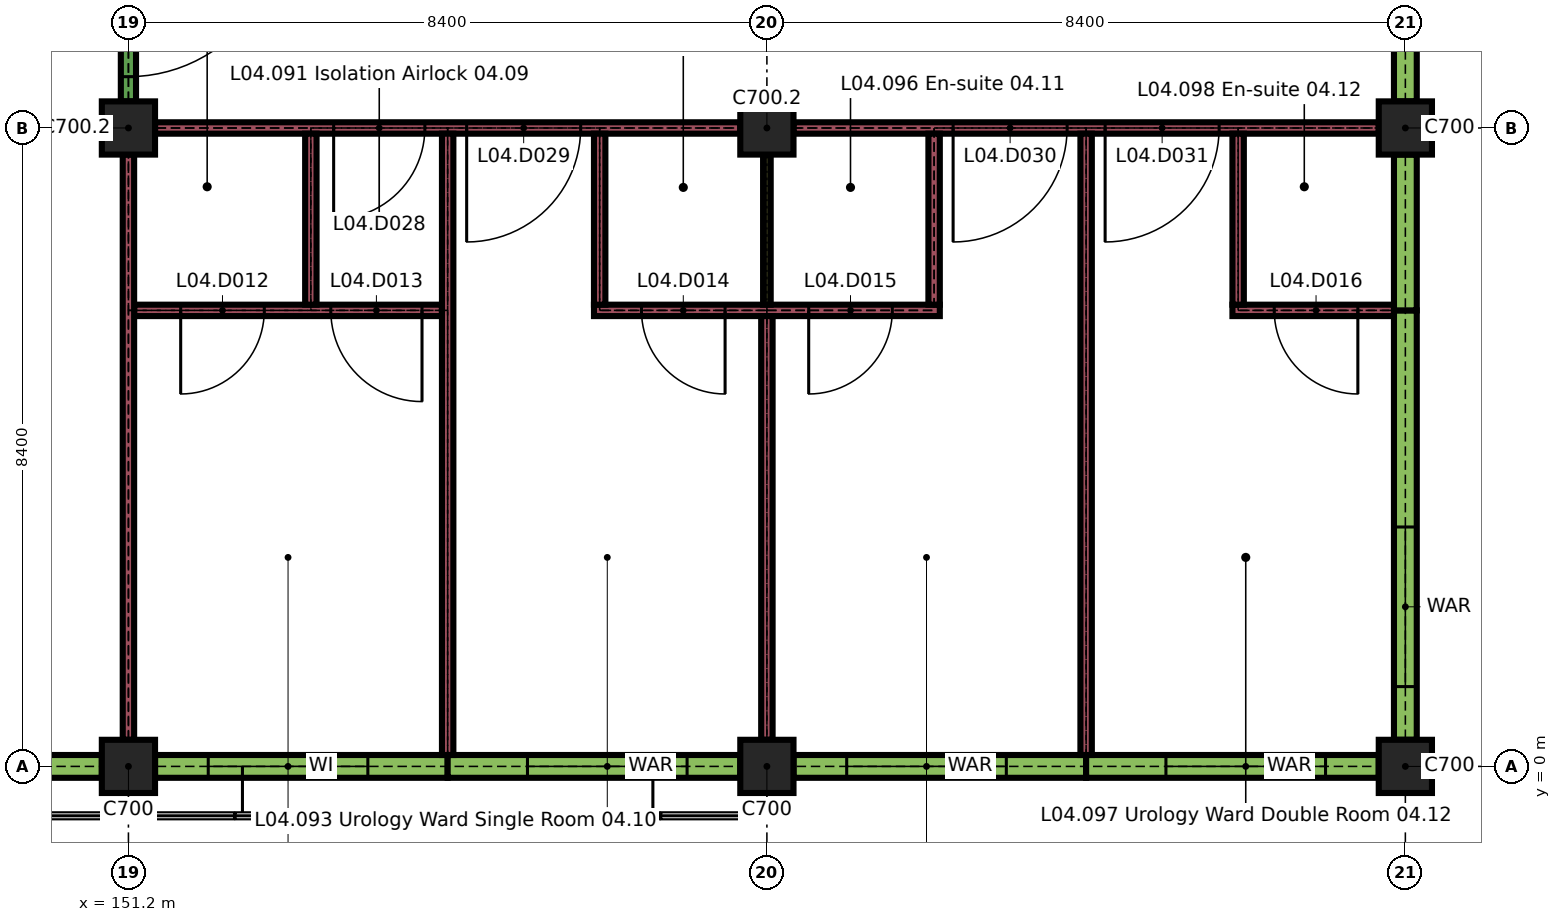
"""IFC4 building model, lengths in metres.
Left out: names, types, materials, properties, quantities, classifications, styles, units other than length and angle.
Written with IfcOpenShell. Run it as: python <this file> out.ifc"""

import sys

from ifc_helpers import new_model, si_unit, direction, frame, frame_2d, origin, origin_2d, place, context, subcontext, project, spatial, rectangle, extrude, element, fill, save


model = new_model("IFC4")
c1 = context("Model", 3, precision=1e-05, world=origin(), true_north=direction((0.0, 1.0)))
c2 = subcontext(c1, "Body", "Model", "MODEL_VIEW")
j1 = project(units=[si_unit("LENGTHUNIT", "METRE"), si_unit("PLANEANGLEUNIT", "RADIAN")], contexts=[c1])
p1 = place(None, origin())
s1 = spatial("IfcSite", under=j1, at=p1, CompositionType="ELEMENT")
p2 = place(p1, origin())
s2 = spatial("IfcBuilding", under=s1, at=p2, CompositionType="ELEMENT")
p3 = place(p2, frame((0.0, 0.0, 18.9)))
s3 = spatial("IfcBuildingStorey", under=s2, at=p3, CompositionType="ELEMENT", Elevation=18.9)
for number, where, z_axis, x_axis in (
    (1, (151.2, 0.0, 0.0), (0.0, 0.0, 1.0), (1.0, 0.0, 0.0)),
    (2, (159.6, 0.0, 0.0), (0.0, 0.0, 1.0), (1.0, 0.0, 0.0)),
    (3, (168.0, 0.0, 0.0), (0.0, 0.0, 1.0), (1.0, 0.0, 0.0)),
    (4, (151.2, 8.4, 0.0), (0.0, 0.0, 1.0), (1.0, 0.0, 0.0)),
    (5, (159.6, 8.4, 0.0), (0.0, 0.0, 1.0), (1.0, 0.0, 0.0)),
    (6, (168.0, 8.4, 0.0), (0.0, 0.0, 1.0), (1.0, 0.0, 0.0)),
):
    element("IfcColumn", number, at=place(p3, frame(where, z_axis=z_axis, x_axis=x_axis)), inside=s3, PredefinedType="COLUMN", context=c2, shape_type="SweptSolid", body=[
        extrude(rectangle(XDim=0.7, YDim=0.7, at=origin_2d()), origin(), (0.0, 0.0, 1.0), 3.26),
    ])
p4 = place(p3, frame((149.7, 0.0, 0.0), z_axis=(0.0, 0.0, 1.0), x_axis=(1.0, 0.0, 0.0)))
e7 = element("IfcWall", 7, at=p4, inside=s3, PredefinedType="SOLIDWALL", context=c2, shape_type="SweptSolid", body=[
    extrude(rectangle(XDim=1.15, YDim=0.3, at=frame_2d((0.575, 0.0))), origin(), (0.0, 0.0, 1.0), 2.96),
])
p5 = place(p3, frame((151.55, 0.0, 0.0), z_axis=(0.0, 0.0, 1.0), x_axis=(1.0, 0.0, 0.0)))
e8 = element("IfcWall", 8, at=p5, inside=s3, PredefinedType="SOLIDWALL", context=c2, shape_type="SweptSolid", body=[
    extrude(rectangle(XDim=3.85, YDim=0.3, at=frame_2d((1.925, 0.0))), origin(), (0.0, 0.0, 1.0), 2.96),
])
p6 = place(p5, frame((0.7, 0.0, 0.9)))
e9 = element("IfcOpeningElement", 9, at=p6, cuts=e8, PredefinedType="OPENING", context=c2, shape_type="SweptSolid", body=[
    extrude(rectangle(XDim=2.1, YDim=1.5, at=frame_2d((1.05, 0.75))), frame((0.0, 0.16, 0.0), z_axis=(0.0, -1.0, 0.0), x_axis=(1.0, 0.0, 0.0)), (0.0, 0.0, 1.0), 0.32),
])
p7 = place(p3, frame((155.4, 0.0, 0.0), z_axis=(0.0, 0.0, 1.0), x_axis=(1.0, 0.0, 0.0)))
e10 = element("IfcWall", 10, at=p7, inside=s3, PredefinedType="SOLIDWALL", context=c2, shape_type="SweptSolid", body=[
    extrude(rectangle(XDim=3.85, YDim=0.3, at=frame_2d((1.925, 0.0))), origin(), (0.0, 0.0, 1.0), 2.96),
])
p8 = place(p7, frame((1.05, 0.0, 0.9)))
e11 = element("IfcOpeningElement", 11, at=p8, cuts=e10, PredefinedType="OPENING", context=c2, shape_type="SweptSolid", body=[
    extrude(rectangle(XDim=2.1, YDim=1.5, at=frame_2d((1.05, 0.75))), frame((0.0, 0.16, 0.0), z_axis=(0.0, -1.0, 0.0), x_axis=(1.0, 0.0, 0.0)), (0.0, 0.0, 1.0), 0.32),
])
p9 = place(p3, frame((159.95, 0.0, 0.0), z_axis=(0.0, 0.0, 1.0), x_axis=(1.0, 0.0, 0.0)))
e12 = element("IfcWall", 12, at=p9, inside=s3, PredefinedType="SOLIDWALL", context=c2, shape_type="SweptSolid", body=[
    extrude(rectangle(XDim=3.85, YDim=0.3, at=frame_2d((1.925, 0.0))), origin(), (0.0, 0.0, 1.0), 2.96),
])
p10 = place(p9, frame((0.7, 0.0, 0.9)))
e13 = element("IfcOpeningElement", 13, at=p10, cuts=e12, PredefinedType="OPENING", context=c2, shape_type="SweptSolid", body=[
    extrude(rectangle(XDim=2.1, YDim=1.5, at=frame_2d((1.05, 0.75))), frame((0.0, 0.16, 0.0), z_axis=(0.0, -1.0, 0.0), x_axis=(1.0, 0.0, 0.0)), (0.0, 0.0, 1.0), 0.32),
])
p11 = place(p3, frame((163.8, 0.0, 0.0), z_axis=(0.0, 0.0, 1.0), x_axis=(1.0, 0.0, 0.0)))
e14 = element("IfcWall", 14, at=p11, inside=s3, PredefinedType="SOLIDWALL", context=c2, shape_type="SweptSolid", body=[
    extrude(rectangle(XDim=3.85, YDim=0.3, at=frame_2d((1.925, 0.0))), origin(), (0.0, 0.0, 1.0), 2.96),
])
p12 = place(p11, frame((1.05, 0.0, 0.9)))
e15 = element("IfcOpeningElement", 15, at=p12, cuts=e14, PredefinedType="OPENING", context=c2, shape_type="SweptSolid", body=[
    extrude(rectangle(XDim=2.1, YDim=1.5, at=frame_2d((1.05, 0.75))), frame((0.0, 0.16, 0.0), z_axis=(0.0, -1.0, 0.0), x_axis=(1.0, 0.0, 0.0)), (0.0, 0.0, 1.0), 0.32),
])
p13 = place(p3, frame((168.0, 0.35, 0.0), z_axis=(0.0, 0.0, 1.0), x_axis=(0.0, 1.0, 0.0)))
e16 = element("IfcWall", 16, at=p13, inside=s3, PredefinedType="SOLIDWALL", context=c2, shape_type="SweptSolid", body=[
    extrude(rectangle(XDim=5.65, YDim=0.3, at=frame_2d((2.825, 0.0))), origin(), (0.0, 0.0, 1.0), 2.96),
])
p14 = place(p13, frame((0.7, 0.0, 0.9)))
e17 = element("IfcOpeningElement", 17, at=p14, cuts=e16, PredefinedType="OPENING", context=c2, shape_type="SweptSolid", body=[
    extrude(rectangle(XDim=2.1, YDim=1.5, at=frame_2d((1.05, 0.75))), frame((0.0, 0.16, 0.0), z_axis=(0.0, -1.0, 0.0), x_axis=(1.0, 0.0, 0.0)), (0.0, 0.0, 1.0), 0.32),
])
p15 = place(p3, frame((168.0, 6.0, 0.0), z_axis=(0.0, 0.0, 1.0), x_axis=(0.0, 1.0, 0.0)))
e18 = element("IfcWall", 18, at=p15, inside=s3, PredefinedType="SOLIDWALL", context=c2, shape_type="SweptSolid", body=[
    extrude(rectangle(XDim=2.05, YDim=0.3, at=frame_2d((1.025, 0.0))), origin(), (0.0, 0.0, 1.0), 2.96),
])
p16 = place(p3, frame((168.0, 8.75, 0.0), z_axis=(0.0, 0.0, 1.0), x_axis=(0.0, 1.0, 0.0)))
e19 = element("IfcWall", 19, at=p16, inside=s3, PredefinedType="SOLIDWALL", context=c2, shape_type="SweptSolid", body=[
    extrude(rectangle(XDim=2.65, YDim=0.3, at=frame_2d((1.325, 0.0))), origin(), (0.0, 0.0, 1.0), 2.96),
])
p17 = place(p16, frame((1.3, 0.0, 0.9)))
e20 = element("IfcOpeningElement", 20, at=p17, cuts=e19, PredefinedType="OPENING", context=c2, shape_type="SweptSolid", body=[
    extrude(rectangle(XDim=0.9, YDim=1.5, at=frame_2d((0.45, 0.75))), frame((0.0, 0.16, 0.0), z_axis=(0.0, -1.0, 0.0), x_axis=(1.0, 0.0, 0.0)), (0.0, 0.0, 1.0), 0.32),
])
p18 = place(p3, frame((151.275, 6.0, 0.0), z_axis=(0.0, 0.0, 1.0), x_axis=(1.0, 0.0, 0.0)))
e21 = element("IfcWall", 21, at=p18, inside=s3, PredefinedType="PARTITIONING", context=c2, shape_type="SweptSolid", body=[
    extrude(rectangle(XDim=4.05, YDim=0.15, at=frame_2d((2.025, 0.0))), origin(), (0.0, 0.0, 1.0), 3.26),
])
p19 = place(p18, frame((0.613, 0.0, 0.0)))
e22 = element("IfcOpeningElement", 22, at=p19, cuts=e21, PredefinedType="OPENING", context=c2, shape_type="SweptSolid", body=[
    extrude(rectangle(XDim=1.1, YDim=2.1, at=frame_2d((0.55, 1.05))), frame((0.0, 0.085, 0.0), z_axis=(0.0, -1.0, 0.0), x_axis=(1.0, 0.0, 0.0)), (0.0, 0.0, 1.0), 0.17),
])
p20 = place(p18, frame((2.587, 0.0, 0.0)))
e23 = element("IfcOpeningElement", 23, at=p20, cuts=e21, PredefinedType="OPENING", context=c2, shape_type="SweptSolid", body=[
    extrude(rectangle(XDim=1.2, YDim=2.1, at=frame_2d((0.6, 1.05))), frame((0.0, 0.085, 0.0), z_axis=(0.0, -1.0, 0.0), x_axis=(1.0, 0.0, 0.0)), (0.0, 0.0, 1.0), 0.17),
])
p21 = place(p3, frame((157.325, 6.0, 0.0), z_axis=(0.0, 0.0, 1.0), x_axis=(1.0, 0.0, 0.0)))
e24 = element("IfcWall", 24, at=p21, inside=s3, PredefinedType="PARTITIONING", context=c2, shape_type="SweptSolid", body=[
    extrude(rectangle(XDim=4.55, YDim=0.15, at=frame_2d((2.275, 0.0))), origin(), (0.0, 0.0, 1.0), 3.26),
])
p22 = place(p21, frame((0.625, 0.0, 0.0)))
e25 = element("IfcOpeningElement", 25, at=p22, cuts=e24, PredefinedType="OPENING", context=c2, shape_type="SweptSolid", body=[
    extrude(rectangle(XDim=1.1, YDim=2.1, at=frame_2d((0.55, 1.05))), frame((0.0, 0.085, 0.0), z_axis=(0.0, -1.0, 0.0), x_axis=(1.0, 0.0, 0.0)), (0.0, 0.0, 1.0), 0.17),
])
p23 = place(p21, frame((2.825, 0.0, 0.0)))
e26 = element("IfcOpeningElement", 26, at=p23, cuts=e24, PredefinedType="OPENING", context=c2, shape_type="SweptSolid", body=[
    extrude(rectangle(XDim=1.1, YDim=2.1, at=frame_2d((0.55, 1.05))), frame((0.0, 0.085, 0.0), z_axis=(0.0, -1.0, 0.0), x_axis=(1.0, 0.0, 0.0)), (0.0, 0.0, 1.0), 0.17),
])
p24 = place(p3, frame((165.725, 6.0, 0.0), z_axis=(0.0, 0.0, 1.0), x_axis=(1.0, 0.0, 0.0)))
e27 = element("IfcWall", 27, at=p24, inside=s3, PredefinedType="PARTITIONING", context=c2, shape_type="SweptSolid", body=[
    extrude(rectangle(XDim=2.125, YDim=0.15, at=frame_2d((1.062, 0.0))), origin(), (0.0, 0.0, 1.0), 3.26),
])
p25 = place(p24, frame((0.55, 0.0, 0.0)))
e28 = element("IfcOpeningElement", 28, at=p25, cuts=e27, PredefinedType="OPENING", context=c2, shape_type="SweptSolid", body=[
    extrude(rectangle(XDim=1.1, YDim=2.1, at=frame_2d((0.55, 1.05))), frame((0.0, 0.085, 0.0), z_axis=(0.0, -1.0, 0.0), x_axis=(1.0, 0.0, 0.0)), (0.0, 0.0, 1.0), 0.17),
])
p26 = place(p3, frame((151.55, 8.4, 0.0), z_axis=(0.0, 0.0, 1.0), x_axis=(1.0, 0.0, 0.0)))
e29 = element("IfcWall", 29, at=p26, inside=s3, PredefinedType="PARTITIONING", context=c2, shape_type="SweptSolid", body=[
    extrude(rectangle(XDim=7.7, YDim=0.15, at=frame_2d((3.85, 0.0))), origin(), (0.0, 0.0, 1.0), 3.26),
])
p27 = place(p26, frame((2.35, 0.0, 0.0)))
e30 = element("IfcOpeningElement", 30, at=p27, cuts=e29, PredefinedType="OPENING", context=c2, shape_type="SweptSolid", body=[
    extrude(rectangle(XDim=1.2, YDim=2.1, at=frame_2d((0.6, 1.05))), frame((0.0, 0.085, 0.0), z_axis=(0.0, -1.0, 0.0), x_axis=(1.0, 0.0, 0.0)), (0.0, 0.0, 1.0), 0.17),
])
p28 = place(p26, frame((4.1, 0.0, 0.0)))
e31 = element("IfcOpeningElement", 31, at=p28, cuts=e29, PredefinedType="OPENING", context=c2, shape_type="SweptSolid", body=[
    extrude(rectangle(XDim=1.5, YDim=2.4, at=frame_2d((0.75, 1.2))), frame((0.0, 0.085, 0.0), z_axis=(0.0, -1.0, 0.0), x_axis=(1.0, 0.0, 0.0)), (0.0, 0.0, 1.0), 0.17),
])
p29 = place(p3, frame((159.95, 8.4, 0.0), z_axis=(0.0, 0.0, 1.0), x_axis=(1.0, 0.0, 0.0)))
e32 = element("IfcWall", 32, at=p29, inside=s3, PredefinedType="PARTITIONING", context=c2, shape_type="SweptSolid", body=[
    extrude(rectangle(XDim=7.7, YDim=0.15, at=frame_2d((3.85, 0.0))), origin(), (0.0, 0.0, 1.0), 3.26),
])
p30 = place(p29, frame((2.1, 0.0, 0.0)))
e33 = element("IfcOpeningElement", 33, at=p30, cuts=e32, PredefinedType="OPENING", context=c2, shape_type="SweptSolid", body=[
    extrude(rectangle(XDim=1.5, YDim=2.4, at=frame_2d((0.75, 1.2))), frame((0.0, 0.085, 0.0), z_axis=(0.0, -1.0, 0.0), x_axis=(1.0, 0.0, 0.0)), (0.0, 0.0, 1.0), 0.17),
])
p31 = place(p29, frame((4.1, 0.0, 0.0)))
e34 = element("IfcOpeningElement", 34, at=p31, cuts=e32, PredefinedType="OPENING", context=c2, shape_type="SweptSolid", body=[
    extrude(rectangle(XDim=1.5, YDim=2.4, at=frame_2d((0.75, 1.2))), frame((0.0, 0.085, 0.0), z_axis=(0.0, -1.0, 0.0), x_axis=(1.0, 0.0, 0.0)), (0.0, 0.0, 1.0), 0.17),
])
p32 = place(p3, frame((151.2, 0.35, 0.0), z_axis=(0.0, 0.0, 1.0), x_axis=(0.0, 1.0, 0.0)))
e35 = element("IfcWall", 35, at=p32, inside=s3, PredefinedType="PARTITIONING", context=c2, shape_type="SweptSolid", body=[
    extrude(rectangle(XDim=7.7, YDim=0.15, at=frame_2d((3.85, 0.0))), origin(), (0.0, 0.0, 1.0), 3.26),
])
p33 = place(p3, frame((151.2, 8.75, 0.0), z_axis=(0.0, 0.0, 1.0), x_axis=(0.0, 1.0, 0.0)))
e36 = element("IfcWall", 36, at=p33, inside=s3, PredefinedType="PARTITIONING", context=c2, shape_type="SweptSolid", body=[
    extrude(rectangle(XDim=7.7, YDim=0.2, at=frame_2d((3.85, 0.0))), origin(), (0.0, 0.0, 1.0), 3.26),
])
p34 = place(p33, frame((0.325, 0.0, 0.0)))
e37 = element("IfcOpeningElement", 37, at=p34, cuts=e36, PredefinedType="OPENING", context=c2, shape_type="SweptSolid", body=[
    extrude(rectangle(XDim=2.0, YDim=2.4, at=frame_2d((1.0, 1.2))), frame((0.0, 0.11, 0.0), z_axis=(0.0, -1.0, 0.0), x_axis=(1.0, 0.0, 0.0)), (0.0, 0.0, 1.0), 0.22),
])
p35 = place(p33, frame((5.375, 0.0, 0.0)))
e38 = element("IfcOpeningElement", 38, at=p35, cuts=e36, PredefinedType="OPENING", context=c2, shape_type="SweptSolid", body=[
    extrude(rectangle(XDim=2.0, YDim=2.4, at=frame_2d((1.0, 1.2))), frame((0.0, 0.11, 0.0), z_axis=(0.0, -1.0, 0.0), x_axis=(1.0, 0.0, 0.0)), (0.0, 0.0, 1.0), 0.22),
])
p36 = place(p3, frame((153.6, 6.075, 0.0), z_axis=(0.0, 0.0, 1.0), x_axis=(0.0, 1.0, 0.0)))
e39 = element("IfcWall", 39, at=p36, inside=s3, PredefinedType="PARTITIONING", context=c2, shape_type="SweptSolid", body=[
    extrude(rectangle(XDim=2.25, YDim=0.15, at=frame_2d((1.125, 0.0))), origin(), (0.0, 0.0, 1.0), 3.26),
])
p37 = place(p3, frame((155.4, 0.15, 0.0), z_axis=(0.0, 0.0, 1.0), x_axis=(0.0, 1.0, 0.0)))
e40 = element("IfcWall", 40, at=p37, inside=s3, PredefinedType="PARTITIONING", context=c2, shape_type="SweptSolid", body=[
    extrude(rectangle(XDim=8.175, YDim=0.15, at=frame_2d((4.087, 0.0))), origin(), (0.0, 0.0, 1.0), 3.26),
])
p38 = place(p3, frame((157.4, 6.075, 0.0), z_axis=(0.0, 0.0, 1.0), x_axis=(0.0, 1.0, 0.0)))
e41 = element("IfcWall", 41, at=p38, inside=s3, PredefinedType="PARTITIONING", context=c2, shape_type="SweptSolid", body=[
    extrude(rectangle(XDim=2.25, YDim=0.15, at=frame_2d((1.125, 0.0))), origin(), (0.0, 0.0, 1.0), 3.26),
])
p39 = place(p3, frame((159.6, 0.35, 0.0), z_axis=(0.0, 0.0, 1.0), x_axis=(0.0, 1.0, 0.0)))
e42 = element("IfcWall", 42, at=p39, inside=s3, PredefinedType="PARTITIONING", context=c2, shape_type="SweptSolid", body=[
    extrude(rectangle(XDim=5.575, YDim=0.15, at=frame_2d((2.788, 0.0))), origin(), (0.0, 0.0, 1.0), 3.26),
])
p40 = place(p3, frame((159.6, 6.075, 0.0), z_axis=(0.0, 0.0, 1.0), x_axis=(0.0, 1.0, 0.0)))
e43 = element("IfcWall", 43, at=p40, inside=s3, PredefinedType="PARTITIONING", context=c2, shape_type="SweptSolid", body=[
    extrude(rectangle(XDim=1.975, YDim=0.1, at=frame_2d((0.988, 0.0))), origin(), (0.0, 0.0, 1.0), 3.26),
])
p41 = place(p3, frame((161.8, 6.075, 0.0), z_axis=(0.0, 0.0, 1.0), x_axis=(0.0, 1.0, 0.0)))
e44 = element("IfcWall", 44, at=p41, inside=s3, PredefinedType="PARTITIONING", context=c2, shape_type="SweptSolid", body=[
    extrude(rectangle(XDim=2.25, YDim=0.15, at=frame_2d((1.125, 0.0))), origin(), (0.0, 0.0, 1.0), 3.26),
])
p42 = place(p3, frame((163.8, 0.15, 0.0), z_axis=(0.0, 0.0, 1.0), x_axis=(0.0, 1.0, 0.0)))
e45 = element("IfcWall", 45, at=p42, inside=s3, PredefinedType="PARTITIONING", context=c2, shape_type="SweptSolid", body=[
    extrude(rectangle(XDim=8.175, YDim=0.15, at=frame_2d((4.087, 0.0))), origin(), (0.0, 0.0, 1.0), 3.26),
])
p43 = place(p3, frame((165.8, 6.075, 0.0), z_axis=(0.0, 0.0, 1.0), x_axis=(0.0, 1.0, 0.0)))
e46 = element("IfcWall", 46, at=p43, inside=s3, PredefinedType="PARTITIONING", context=c2, shape_type="SweptSolid", body=[
    extrude(rectangle(XDim=2.25, YDim=0.15, at=frame_2d((1.125, 0.0))), origin(), (0.0, 0.0, 1.0), 3.26),
])
p44 = place(p6, origin())
e47 = element("IfcWindow", 47, at=p44, inside=s3, PartitioningType="SINGLE_PANEL", PredefinedType="WINDOW", context=c2, shape_type="SweptSolid", body=[
    extrude(rectangle(XDim=2.1, YDim=1.5, at=frame_2d((1.05, 0.75))), frame((0.0, 0.045, 0.0), z_axis=(0.0, -1.0, 0.0), x_axis=(1.0, 0.0, 0.0)), (0.0, 0.0, 1.0), 0.09),
])
fill(e9, e47)
p45 = place(p8, origin())
e48 = element("IfcWindow", 48, at=p45, inside=s3, PartitioningType="DOUBLE_PANEL_VERTICAL", PredefinedType="WINDOW", context=c2, shape_type="SweptSolid", body=[
    extrude(rectangle(XDim=2.1, YDim=1.5, at=frame_2d((1.05, 0.75))), frame((0.0, 0.05, 0.0), z_axis=(0.0, -1.0, 0.0), x_axis=(1.0, 0.0, 0.0)), (0.0, 0.0, 1.0), 0.1),
])
fill(e11, e48)
p46 = place(p10, origin())
e49 = element("IfcWindow", 49, at=p46, inside=s3, PartitioningType="DOUBLE_PANEL_VERTICAL", PredefinedType="WINDOW", context=c2, shape_type="SweptSolid", body=[
    extrude(rectangle(XDim=2.1, YDim=1.5, at=frame_2d((1.05, 0.75))), frame((0.0, 0.05, 0.0), z_axis=(0.0, -1.0, 0.0), x_axis=(1.0, 0.0, 0.0)), (0.0, 0.0, 1.0), 0.1),
])
fill(e13, e49)
p47 = place(p12, origin())
e50 = element("IfcWindow", 50, at=p47, inside=s3, PartitioningType="DOUBLE_PANEL_VERTICAL", PredefinedType="WINDOW", context=c2, shape_type="SweptSolid", body=[
    extrude(rectangle(XDim=2.1, YDim=1.5, at=frame_2d((1.05, 0.75))), frame((0.0, 0.05, 0.0), z_axis=(0.0, -1.0, 0.0), x_axis=(1.0, 0.0, 0.0)), (0.0, 0.0, 1.0), 0.1),
])
fill(e15, e50)
p48 = place(p14, origin())
e51 = element("IfcWindow", 51, at=p48, inside=s3, PartitioningType="DOUBLE_PANEL_VERTICAL", PredefinedType="WINDOW", context=c2, shape_type="SweptSolid", body=[
    extrude(rectangle(XDim=2.1, YDim=1.5, at=frame_2d((1.05, 0.75))), frame((0.0, 0.05, 0.0), z_axis=(0.0, -1.0, 0.0), x_axis=(1.0, 0.0, 0.0)), (0.0, 0.0, 1.0), 0.1),
])
fill(e17, e51)
p49 = place(p19, origin())
e52 = element("IfcDoor", 52, at=p49, inside=s3, OperationType="SINGLE_SWING_LEFT", PredefinedType="DOOR", context=c2, shape_type="SweptSolid", body=[
    extrude(rectangle(XDim=1.1, YDim=2.1, at=frame_2d((0.55, 1.05))), frame((0.0, 0.025, 0.0), z_axis=(0.0, -1.0, 0.0), x_axis=(1.0, 0.0, 0.0)), (0.0, 0.0, 1.0), 0.05),
])
fill(e22, e52)
p50 = place(p20, origin())
e53 = element("IfcDoor", 53, at=p50, inside=s3, OperationType="SINGLE_SWING_RIGHT", PredefinedType="DOOR", context=c2, shape_type="SweptSolid", body=[
    extrude(rectangle(XDim=1.2, YDim=2.1, at=frame_2d((0.6, 1.05))), frame((0.0, 0.05, 0.0), z_axis=(0.0, -1.0, 0.0), x_axis=(1.0, 0.0, 0.0)), (0.0, 0.0, 1.0), 0.1),
])
fill(e23, e53)
p51 = place(p22, origin())
e54 = element("IfcDoor", 54, at=p51, inside=s3, OperationType="SINGLE_SWING_RIGHT", PredefinedType="DOOR", context=c2, shape_type="SweptSolid", body=[
    extrude(rectangle(XDim=1.1, YDim=2.1, at=frame_2d((0.55, 1.05))), frame((0.0, 0.025, 0.0), z_axis=(0.0, -1.0, 0.0), x_axis=(1.0, 0.0, 0.0)), (0.0, 0.0, 1.0), 0.05),
])
fill(e25, e54)
p52 = place(p23, origin())
e55 = element("IfcDoor", 55, at=p52, inside=s3, OperationType="SINGLE_SWING_LEFT", PredefinedType="DOOR", context=c2, shape_type="SweptSolid", body=[
    extrude(rectangle(XDim=1.1, YDim=2.1, at=frame_2d((0.55, 1.05))), frame((0.0, 0.025, 0.0), z_axis=(0.0, -1.0, 0.0), x_axis=(1.0, 0.0, 0.0)), (0.0, 0.0, 1.0), 0.05),
])
fill(e26, e55)
p53 = place(p25, origin())
e56 = element("IfcDoor", 56, at=p53, inside=s3, OperationType="SINGLE_SWING_RIGHT", PredefinedType="DOOR", context=c2, shape_type="SweptSolid", body=[
    extrude(rectangle(XDim=1.1, YDim=2.1, at=frame_2d((0.55, 1.05))), frame((0.0, 0.025, 0.0), z_axis=(0.0, -1.0, 0.0), x_axis=(1.0, 0.0, 0.0)), (0.0, 0.0, 1.0), 0.05),
])
fill(e28, e56)
p54 = place(p27, origin())
e57 = element("IfcDoor", 57, at=p54, inside=s3, OperationType="SINGLE_SWING_LEFT", PredefinedType="DOOR", context=c2, shape_type="SweptSolid", body=[
    extrude(rectangle(XDim=1.2, YDim=2.1, at=frame_2d((0.6, 1.05))), frame((0.0, 0.05, 0.0), z_axis=(0.0, -1.0, 0.0), x_axis=(1.0, 0.0, 0.0)), (0.0, 0.0, 1.0), 0.1),
])
fill(e30, e57)
p55 = place(p28, origin())
e58 = element("IfcDoor", 58, at=p55, inside=s3, OperationType="SINGLE_SWING_LEFT", PredefinedType="DOOR", context=c2, shape_type="SweptSolid", body=[
    extrude(rectangle(XDim=1.5, YDim=2.4, at=frame_2d((0.75, 1.2))), frame((0.0, 0.03, 0.0), z_axis=(0.0, -1.0, 0.0), x_axis=(1.0, 0.0, 0.0)), (0.0, 0.0, 1.0), 0.06),
])
fill(e31, e58)
p56 = place(p30, origin())
e59 = element("IfcDoor", 59, at=p56, inside=s3, OperationType="SINGLE_SWING_LEFT", PredefinedType="DOOR", context=c2, shape_type="SweptSolid", body=[
    extrude(rectangle(XDim=1.5, YDim=2.4, at=frame_2d((0.75, 1.2))), frame((0.0, 0.03, 0.0), z_axis=(0.0, -1.0, 0.0), x_axis=(1.0, 0.0, 0.0)), (0.0, 0.0, 1.0), 0.06),
])
fill(e33, e59)
p57 = place(p31, origin())
e60 = element("IfcDoor", 60, at=p57, inside=s3, OperationType="SINGLE_SWING_LEFT", PredefinedType="DOOR", context=c2, shape_type="SweptSolid", body=[
    extrude(rectangle(XDim=1.5, YDim=2.4, at=frame_2d((0.75, 1.2))), frame((0.0, 0.03, 0.0), z_axis=(0.0, -1.0, 0.0), x_axis=(1.0, 0.0, 0.0)), (0.0, 0.0, 1.0), 0.06),
])
fill(e34, e60)
p58 = place(p34, origin())
e61 = element("IfcDoor", 61, at=p58, inside=s3, OperationType="SINGLE_SWING_RIGHT", PredefinedType="DOOR", context=c2, shape_type="SweptSolid", body=[
    extrude(rectangle(XDim=2.0, YDim=2.4, at=frame_2d((1.0, 1.2))), frame((0.0, 0.03, 0.0), z_axis=(0.0, -1.0, 0.0), x_axis=(1.0, 0.0, 0.0)), (0.0, 0.0, 1.0), 0.06),
])
fill(e37, e61)
save(model, sys.argv[1])
